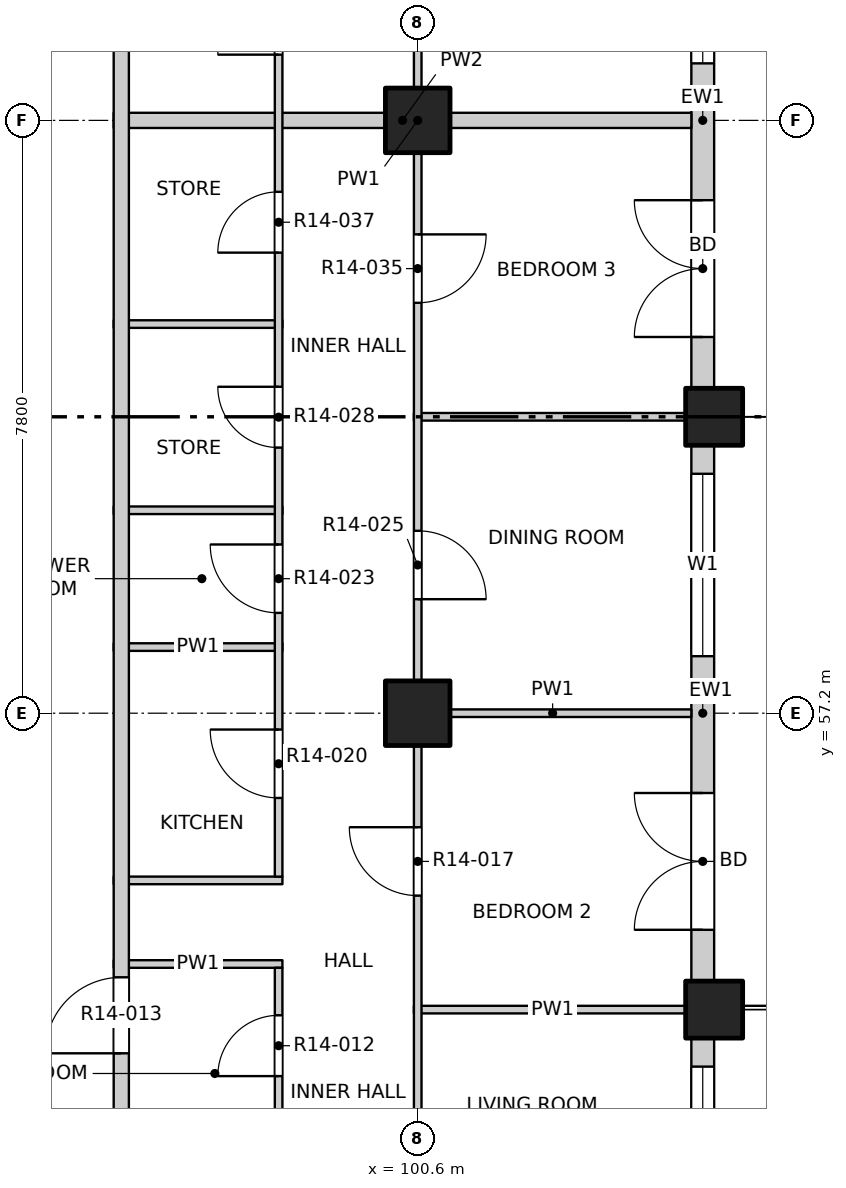
"""IFC4 building model, lengths in metres.
Left out: names, types, materials, properties, quantities, classifications, styles, units other than length and angle.
Written with IfcOpenShell. Run it as: python <this file> out.ifc"""

import sys

from ifc_helpers import new_model, si_unit, direction, frame, frame_2d, origin, origin_2d, place, context, subcontext, project, spatial, rectangle, extrude, element, fill, save


model = new_model("IFC4")
c1 = context("Model", 3, precision=1e-05, world=origin(), true_north=direction((0.0, 1.0)))
c2 = subcontext(c1, "Body", "Model", "MODEL_VIEW")
j1 = project(units=[si_unit("LENGTHUNIT", "METRE"), si_unit("PLANEANGLEUNIT", "RADIAN")], contexts=[c1])
p1 = place(None, origin())
s1 = spatial("IfcSite", under=j1, at=p1, CompositionType="ELEMENT")
p2 = place(p1, origin())
s2 = spatial("IfcBuilding", under=s1, at=p2, CompositionType="ELEMENT")
p3 = place(p2, frame((0.0, 0.0, 155.4)))
s3 = spatial("IfcBuildingStorey", under=s2, at=p3, CompositionType="ELEMENT", Elevation=155.4)
for number, where, z_axis, x_axis in (
    (1, (104.5, 53.3, -0.25), (0.0, 0.0, 1.0), (1.0, 0.0, 0.0)),
    (2, (104.5, 61.1, -0.25), (0.0, 0.0, 1.0), (1.0, 0.0, 0.0)),
):
    element("IfcColumn", number, at=place(p3, frame(where, z_axis=z_axis, x_axis=x_axis)), inside=s3, PredefinedType="COLUMN", context=c2, shape_type="SweptSolid", body=[
        extrude(rectangle(XDim=0.75, YDim=0.75, at=origin_2d()), origin(), (0.0, 0.0, 1.0), 3.4),
    ])
for number, where, z_axis, x_axis in (
    (3, (100.6, 57.2, -0.25), (0.0, 0.0, 1.0), (1.0, 0.0, 0.0)),
    (4, (100.6, 65.0, -0.25), (0.0, 0.0, 1.0), (1.0, 0.0, 0.0)),
):
    element("IfcColumn", number, at=place(p3, frame(where, z_axis=z_axis, x_axis=x_axis)), inside=s3, PredefinedType="COLUMN", context=c2, shape_type="SweptSolid", body=[
        extrude(rectangle(XDim=0.85, YDim=0.85, at=origin_2d()), origin(), (0.0, 0.0, 1.0), 3.4),
    ])
p4 = place(p3, frame((104.35, 49.4, 0.0), z_axis=(0.0, 0.0, 1.0), x_axis=(0.0, 1.0, 0.0)))
e5 = element("IfcWall", 5, at=p4, inside=s3, PredefinedType="SOLIDWALL", context=c2, shape_type="SweptSolid", body=[
    extrude(rectangle(XDim=3.525, YDim=0.3, at=frame_2d((1.763, 0.0))), origin(), (0.0, 0.0, 1.0), 2.7),
])
p5 = place(p4, frame((0.75, 0.0, 0.9)))
e6 = element("IfcOpeningElement", 6, at=p5, cuts=e5, PredefinedType="OPENING", context=c2, shape_type="SweptSolid", body=[
    extrude(rectangle(XDim=2.4, YDim=1.8, at=frame_2d((1.2, 0.9))), frame((0.0, 0.16, 0.0), z_axis=(0.0, -1.0, 0.0), x_axis=(1.0, 0.0, 0.0)), (0.0, 0.0, 1.0), 0.32),
])
p6 = place(p3, frame((104.35, 53.675, 0.0), z_axis=(0.0, 0.0, 1.0), x_axis=(0.0, 1.0, 0.0)))
e7 = element("IfcWall", 7, at=p6, inside=s3, PredefinedType="SOLIDWALL", context=c2, shape_type="SweptSolid", body=[
    extrude(rectangle(XDim=7.05, YDim=0.3, at=frame_2d((3.525, 0.0))), origin(), (0.0, 0.0, 1.0), 2.7),
])
p7 = place(p6, frame((0.675, 0.0, 0.0)))
e8 = element("IfcOpeningElement", 8, at=p7, cuts=e7, PredefinedType="OPENING", context=c2, shape_type="SweptSolid", body=[
    extrude(rectangle(XDim=1.8, YDim=2.4, at=frame_2d((0.9, 1.2))), frame((0.0, 0.16, 0.0), z_axis=(0.0, -1.0, 0.0), x_axis=(1.0, 0.0, 0.0)), (0.0, 0.0, 1.0), 0.32),
])
p8 = place(p6, frame((4.275, 0.0, 0.9)))
e9 = element("IfcOpeningElement", 9, at=p8, cuts=e7, PredefinedType="OPENING", context=c2, shape_type="SweptSolid", body=[
    extrude(rectangle(XDim=2.4, YDim=1.8, at=frame_2d((1.2, 0.9))), frame((0.0, 0.16, 0.0), z_axis=(0.0, -1.0, 0.0), x_axis=(1.0, 0.0, 0.0)), (0.0, 0.0, 1.0), 0.32),
])
p9 = place(p3, frame((104.35, 61.475, 0.0), z_axis=(0.0, 0.0, 1.0), x_axis=(0.0, 1.0, 0.0)))
e10 = element("IfcWall", 10, at=p9, inside=s3, PredefinedType="SOLIDWALL", context=c2, shape_type="SweptSolid", body=[
    extrude(rectangle(XDim=7.05, YDim=0.3, at=frame_2d((3.525, 0.0))), origin(), (0.0, 0.0, 1.0), 2.7),
])
p10 = place(p9, frame((0.675, 0.0, 0.0)))
e11 = element("IfcOpeningElement", 11, at=p10, cuts=e10, PredefinedType="OPENING", context=c2, shape_type="SweptSolid", body=[
    extrude(rectangle(XDim=1.8, YDim=2.4, at=frame_2d((0.9, 1.2))), frame((0.0, 0.16, 0.0), z_axis=(0.0, -1.0, 0.0), x_axis=(1.0, 0.0, 0.0)), (0.0, 0.0, 1.0), 0.32),
])
p11 = place(p9, frame((4.275, 0.0, 0.9)))
e12 = element("IfcOpeningElement", 12, at=p11, cuts=e10, PredefinedType="OPENING", context=c2, shape_type="SweptSolid", body=[
    extrude(rectangle(XDim=2.4, YDim=1.8, at=frame_2d((1.2, 0.9))), frame((0.0, 0.16, 0.0), z_axis=(0.0, -1.0, 0.0), x_axis=(1.0, 0.0, 0.0)), (0.0, 0.0, 1.0), 0.32),
])
p12 = place(p3, frame((100.55, 53.3, 0.0), z_axis=(0.0, 0.0, 1.0), x_axis=(1.0, 0.0, 0.0)))
e13 = element("IfcWall", 13, at=p12, inside=s3, PredefinedType="PARTITIONING", context=c2, shape_type="SweptSolid", body=[
    extrude(rectangle(XDim=3.65, YDim=0.1, at=frame_2d((1.825, 0.0))), origin(), (0.0, 0.0, 1.0), 3.15),
])
for number, where, z_axis, x_axis in (
    (14, (96.6, 53.9, 0.0), (0.0, 0.0, 1.0), (1.0, 0.0, 0.0)),
    (15, (96.6, 55.0, 0.0), (0.0, 0.0, 1.0), (1.0, 0.0, 0.0)),
):
    element("IfcWall", number, at=place(p3, frame(where, z_axis=z_axis, x_axis=x_axis)), inside=s3, PredefinedType="PARTITIONING", context=c2, shape_type="SweptSolid", body=[
        extrude(rectangle(XDim=2.22, YDim=0.1, at=frame_2d((1.11, 0.0))), origin(), (0.0, 0.0, 1.0), 3.15),
    ])
p13 = place(p3, frame((100.55, 57.2, 0.0), z_axis=(0.0, 0.0, 1.0), x_axis=(1.0, 0.0, 0.0)))
e16 = element("IfcWall", 16, at=p13, inside=s3, PredefinedType="PARTITIONING", context=c2, shape_type="SweptSolid", body=[
    extrude(rectangle(XDim=3.65, YDim=0.1, at=frame_2d((1.825, 0.0))), origin(), (0.0, 0.0, 1.0), 3.15),
])
for number, where, z_axis, x_axis in (
    (17, (96.6, 58.07, 0.0), (0.0, 0.0, 1.0), (1.0, 0.0, 0.0)),
    (18, (96.6, 59.87, 0.0), (0.0, 0.0, 1.0), (1.0, 0.0, 0.0)),
):
    element("IfcWall", number, at=place(p3, frame(where, z_axis=z_axis, x_axis=x_axis)), inside=s3, PredefinedType="PARTITIONING", context=c2, shape_type="SweptSolid", body=[
        extrude(rectangle(XDim=2.22, YDim=0.1, at=frame_2d((1.11, 0.0))), origin(), (0.0, 0.0, 1.0), 3.15),
    ])
p14 = place(p3, frame((100.55, 61.1, 0.0), z_axis=(0.0, 0.0, 1.0), x_axis=(1.0, 0.0, 0.0)))
e19 = element("IfcWall", 19, at=p14, inside=s3, PredefinedType="PARTITIONING", context=c2, shape_type="SweptSolid", body=[
    extrude(rectangle(XDim=3.65, YDim=0.1, at=frame_2d((1.825, 0.0))), origin(), (0.0, 0.0, 1.0), 2.55),
])
p15 = place(p3, frame((96.6, 62.32, 0.0), z_axis=(0.0, 0.0, 1.0), x_axis=(1.0, 0.0, 0.0)))
e20 = element("IfcWall", 20, at=p15, inside=s3, PredefinedType="PARTITIONING", context=c2, shape_type="SweptSolid", body=[
    extrude(rectangle(XDim=2.22, YDim=0.1, at=frame_2d((1.11, 0.0))), origin(), (0.0, 0.0, 1.0), 3.15),
])
p16 = place(p3, frame((96.6, 65.0, 0.0), z_axis=(0.0, 0.0, 1.0), x_axis=(1.0, 0.0, 0.0)))
e21 = element("IfcWall", 21, at=p16, inside=s3, PredefinedType="PARTITIONING", context=c2, shape_type="SweptSolid", body=[
    extrude(rectangle(XDim=7.6, YDim=0.2, at=frame_2d((3.8, 0.0))), origin(), (0.0, 0.0, 1.0), 3.15),
])
p17 = place(p3, frame((96.7, 49.5, 0.0), z_axis=(0.0, 0.0, 1.0), x_axis=(0.0, 1.0, 0.0)))
e22 = element("IfcWall", 22, at=p17, inside=s3, PredefinedType="PARTITIONING", context=c2, shape_type="SweptSolid", body=[
    extrude(rectangle(XDim=34.7, YDim=0.2, at=frame_2d((17.35, 0.0))), origin(), (0.0, 0.0, 1.0), 3.15),
])
p18 = place(p17, frame((3.225, 0.0, 0.0)))
e23 = element("IfcOpeningElement", 23, at=p18, cuts=e22, PredefinedType="OPENING", context=c2, shape_type="SweptSolid", body=[
    extrude(rectangle(XDim=1.0, YDim=2.1, at=frame_2d((0.5, 1.05))), frame((0.0, 0.11, 0.0), z_axis=(0.0, -1.0, 0.0), x_axis=(1.0, 0.0, 0.0)), (0.0, 0.0, 1.0), 0.22),
])
p19 = place(p17, frame((19.775, 0.0, 0.0)))
e24 = element("IfcOpeningElement", 24, at=p19, cuts=e22, PredefinedType="OPENING", context=c2, shape_type="SweptSolid", body=[
    extrude(rectangle(XDim=1.0, YDim=2.1, at=frame_2d((0.5, 1.05))), frame((0.0, 0.11, 0.0), z_axis=(0.0, -1.0, 0.0), x_axis=(1.0, 0.0, 0.0)), (0.0, 0.0, 1.0), 0.22),
])
p20 = place(p17, frame((24.125, 0.0, 0.0)))
e25 = element("IfcOpeningElement", 25, at=p20, cuts=e22, PredefinedType="OPENING", context=c2, shape_type="SweptSolid", body=[
    extrude(rectangle(XDim=1.0, YDim=2.1, at=frame_2d((0.5, 1.05))), frame((0.0, 0.11, 0.0), z_axis=(0.0, -1.0, 0.0), x_axis=(1.0, 0.0, 0.0)), (0.0, 0.0, 1.0), 0.22),
])
p21 = place(p3, frame((98.77, 49.45, 0.0), z_axis=(0.0, 0.0, 1.0), x_axis=(0.0, 1.0, 0.0)))
e26 = element("IfcWall", 26, at=p21, inside=s3, PredefinedType="PARTITIONING", context=c2, shape_type="SweptSolid", body=[
    extrude(rectangle(XDim=4.4, YDim=0.1, at=frame_2d((2.2, 0.0))), origin(), (0.0, 0.0, 1.0), 3.15),
])
p22 = place(p21, frame((0.675, 0.0, 0.0)))
e27 = element("IfcOpeningElement", 27, at=p22, cuts=e26, PredefinedType="OPENING", context=c2, shape_type="SweptSolid", body=[
    extrude(rectangle(XDim=0.9, YDim=2.1, at=frame_2d((0.45, 1.05))), frame((0.0, 0.06, 0.0), z_axis=(0.0, -1.0, 0.0), x_axis=(1.0, 0.0, 0.0)), (0.0, 0.0, 1.0), 0.12),
])
p23 = place(p21, frame((2.975, 0.0, 0.0)))
e28 = element("IfcOpeningElement", 28, at=p23, cuts=e26, PredefinedType="OPENING", context=c2, shape_type="SweptSolid", body=[
    extrude(rectangle(XDim=0.8, YDim=2.1, at=frame_2d((0.4, 1.05))), frame((0.0, 0.06, 0.0), z_axis=(0.0, -1.0, 0.0), x_axis=(1.0, 0.0, 0.0)), (0.0, 0.0, 1.0), 0.12),
])
p24 = place(p3, frame((98.77, 55.05, 0.0), z_axis=(0.0, 0.0, 1.0), x_axis=(0.0, 1.0, 0.0)))
e29 = element("IfcWall", 29, at=p24, inside=s3, PredefinedType="PARTITIONING", context=c2, shape_type="SweptSolid", body=[
    extrude(rectangle(XDim=15.35, YDim=0.1, at=frame_2d((7.675, 0.0))), origin(), (0.0, 0.0, 1.0), 3.15),
])
p25 = place(p24, frame((1.035, 0.0, 0.0)))
e30 = element("IfcOpeningElement", 30, at=p25, cuts=e29, PredefinedType="OPENING", context=c2, shape_type="SweptSolid", body=[
    extrude(rectangle(XDim=0.9, YDim=2.1, at=frame_2d((0.45, 1.05))), frame((0.0, 0.06, 0.0), z_axis=(0.0, -1.0, 0.0), x_axis=(1.0, 0.0, 0.0)), (0.0, 0.0, 1.0), 0.12),
])
p26 = place(p24, frame((3.47, 0.0, 0.0)))
e31 = element("IfcOpeningElement", 31, at=p26, cuts=e29, PredefinedType="OPENING", context=c2, shape_type="SweptSolid", body=[
    extrude(rectangle(XDim=0.9, YDim=2.1, at=frame_2d((0.45, 1.05))), frame((0.0, 0.06, 0.0), z_axis=(0.0, -1.0, 0.0), x_axis=(1.0, 0.0, 0.0)), (0.0, 0.0, 1.0), 0.12),
])
p27 = place(p24, frame((5.645, 0.0, 0.0)))
e32 = element("IfcOpeningElement", 32, at=p27, cuts=e29, PredefinedType="OPENING", context=c2, shape_type="SweptSolid", body=[
    extrude(rectangle(XDim=0.8, YDim=2.1, at=frame_2d((0.4, 1.05))), frame((0.0, 0.06, 0.0), z_axis=(0.0, -1.0, 0.0), x_axis=(1.0, 0.0, 0.0)), (0.0, 0.0, 1.0), 0.12),
])
p28 = place(p24, frame((8.21, 0.0, 0.0)))
e33 = element("IfcOpeningElement", 33, at=p28, cuts=e29, PredefinedType="OPENING", context=c2, shape_type="SweptSolid", body=[
    extrude(rectangle(XDim=0.8, YDim=2.1, at=frame_2d((0.4, 1.05))), frame((0.0, 0.06, 0.0), z_axis=(0.0, -1.0, 0.0), x_axis=(1.0, 0.0, 0.0)), (0.0, 0.0, 1.0), 0.12),
])
p29 = place(p24, frame((10.815, 0.0, 0.0)))
e34 = element("IfcOpeningElement", 34, at=p29, cuts=e29, PredefinedType="OPENING", context=c2, shape_type="SweptSolid", body=[
    extrude(rectangle(XDim=0.8, YDim=2.1, at=frame_2d((0.4, 1.05))), frame((0.0, 0.06, 0.0), z_axis=(0.0, -1.0, 0.0), x_axis=(1.0, 0.0, 0.0)), (0.0, 0.0, 1.0), 0.12),
])
p30 = place(p24, frame((13.49, 0.0, 0.0)))
e35 = element("IfcOpeningElement", 35, at=p30, cuts=e29, PredefinedType="OPENING", context=c2, shape_type="SweptSolid", body=[
    extrude(rectangle(XDim=0.9, YDim=2.1, at=frame_2d((0.45, 1.05))), frame((0.0, 0.06, 0.0), z_axis=(0.0, -1.0, 0.0), x_axis=(1.0, 0.0, 0.0)), (0.0, 0.0, 1.0), 0.12),
])
p31 = place(p3, frame((100.6, 45.8, 0.0), z_axis=(0.0, 0.0, 1.0), x_axis=(0.0, 1.0, 0.0)))
e36 = element("IfcWall", 36, at=p31, inside=s3, PredefinedType="PARTITIONING", context=c2, shape_type="SweptSolid", body=[
    extrude(rectangle(XDim=38.4, YDim=0.1, at=frame_2d((19.2, 0.0))), origin(), (0.0, 0.0, 1.0), 3.15),
])
p32 = place(p31, frame((1.05, 0.0, 0.0)))
e37 = element("IfcOpeningElement", 37, at=p32, cuts=e36, PredefinedType="OPENING", context=c2, shape_type="SweptSolid", body=[
    extrude(rectangle(XDim=1.2, YDim=2.1, at=frame_2d((0.6, 1.05))), frame((0.0, 0.06, 0.0), z_axis=(0.0, -1.0, 0.0), x_axis=(1.0, 0.0, 0.0)), (0.0, 0.0, 1.0), 0.12),
])
p33 = place(p31, frame((5.1, 0.0, 0.0)))
e38 = element("IfcOpeningElement", 38, at=p33, cuts=e36, PredefinedType="OPENING", context=c2, shape_type="SweptSolid", body=[
    extrude(rectangle(XDim=0.9, YDim=2.1, at=frame_2d((0.45, 1.05))), frame((0.0, 0.06, 0.0), z_axis=(0.0, -1.0, 0.0), x_axis=(1.0, 0.0, 0.0)), (0.0, 0.0, 1.0), 0.12),
])
p34 = place(p31, frame((9.0, 0.0, 0.0)))
e39 = element("IfcOpeningElement", 39, at=p34, cuts=e36, PredefinedType="OPENING", context=c2, shape_type="SweptSolid", body=[
    extrude(rectangle(XDim=0.9, YDim=2.1, at=frame_2d((0.45, 1.05))), frame((0.0, 0.06, 0.0), z_axis=(0.0, -1.0, 0.0), x_axis=(1.0, 0.0, 0.0)), (0.0, 0.0, 1.0), 0.12),
])
p35 = place(p31, frame((12.9, 0.0, 0.0)))
e40 = element("IfcOpeningElement", 40, at=p35, cuts=e36, PredefinedType="OPENING", context=c2, shape_type="SweptSolid", body=[
    extrude(rectangle(XDim=0.9, YDim=2.1, at=frame_2d((0.45, 1.05))), frame((0.0, 0.06, 0.0), z_axis=(0.0, -1.0, 0.0), x_axis=(1.0, 0.0, 0.0)), (0.0, 0.0, 1.0), 0.12),
])
p36 = place(p31, frame((16.8, 0.0, 0.0)))
e41 = element("IfcOpeningElement", 41, at=p36, cuts=e36, PredefinedType="OPENING", context=c2, shape_type="SweptSolid", body=[
    extrude(rectangle(XDim=0.9, YDim=2.1, at=frame_2d((0.45, 1.05))), frame((0.0, 0.06, 0.0), z_axis=(0.0, -1.0, 0.0), x_axis=(1.0, 0.0, 0.0)), (0.0, 0.0, 1.0), 0.12),
])
p37 = place(p31, frame((20.7, 0.0, 0.0)))
e42 = element("IfcOpeningElement", 42, at=p37, cuts=e36, PredefinedType="OPENING", context=c2, shape_type="SweptSolid", body=[
    extrude(rectangle(XDim=0.9, YDim=2.1, at=frame_2d((0.45, 1.05))), frame((0.0, 0.06, 0.0), z_axis=(0.0, -1.0, 0.0), x_axis=(1.0, 0.0, 0.0)), (0.0, 0.0, 1.0), 0.12),
])
p38 = place(p31, frame((24.6, 0.0, 0.0)))
e43 = element("IfcOpeningElement", 43, at=p38, cuts=e36, PredefinedType="OPENING", context=c2, shape_type="SweptSolid", body=[
    extrude(rectangle(XDim=0.9, YDim=2.1, at=frame_2d((0.45, 1.05))), frame((0.0, 0.06, 0.0), z_axis=(0.0, -1.0, 0.0), x_axis=(1.0, 0.0, 0.0)), (0.0, 0.0, 1.0), 0.12),
])
p39 = place(p31, frame((28.5, 0.0, 0.0)))
e44 = element("IfcOpeningElement", 44, at=p39, cuts=e36, PredefinedType="OPENING", context=c2, shape_type="SweptSolid", body=[
    extrude(rectangle(XDim=0.9, YDim=2.1, at=frame_2d((0.45, 1.05))), frame((0.0, 0.06, 0.0), z_axis=(0.0, -1.0, 0.0), x_axis=(1.0, 0.0, 0.0)), (0.0, 0.0, 1.0), 0.12),
])
p40 = place(p31, frame((32.4, 0.0, 0.0)))
e45 = element("IfcOpeningElement", 45, at=p40, cuts=e36, PredefinedType="OPENING", context=c2, shape_type="SweptSolid", body=[
    extrude(rectangle(XDim=0.9, YDim=2.1, at=frame_2d((0.45, 1.05))), frame((0.0, 0.06, 0.0), z_axis=(0.0, -1.0, 0.0), x_axis=(1.0, 0.0, 0.0)), (0.0, 0.0, 1.0), 0.12),
])
p41 = place(p31, frame((36.15, 0.0, 0.0)))
e46 = element("IfcOpeningElement", 46, at=p41, cuts=e36, PredefinedType="OPENING", context=c2, shape_type="SweptSolid", body=[
    extrude(rectangle(XDim=1.2, YDim=2.1, at=frame_2d((0.6, 1.05))), frame((0.0, 0.06, 0.0), z_axis=(0.0, -1.0, 0.0), x_axis=(1.0, 0.0, 0.0)), (0.0, 0.0, 1.0), 0.12),
])
p42 = place(p5, origin())
e47 = element("IfcWindow", 47, at=p42, inside=s3, PartitioningType="DOUBLE_PANEL_VERTICAL", PredefinedType="WINDOW", context=c2, shape_type="SweptSolid", body=[
    extrude(rectangle(XDim=2.4, YDim=1.8, at=frame_2d((1.2, 0.9))), frame((0.0, 0.03, 0.0), z_axis=(0.0, -1.0, 0.0), x_axis=(1.0, 0.0, 0.0)), (0.0, 0.0, 1.0), 0.06),
])
fill(e6, e47)
p43 = place(p7, origin())
e48 = element("IfcDoor", 48, at=p43, inside=s3, OperationType="DOUBLE_DOOR_SINGLE_SWING", PredefinedType="DOOR", context=c2, shape_type="SweptSolid", body=[
    extrude(rectangle(XDim=1.8, YDim=2.4, at=frame_2d((0.9, 1.2))), frame((0.0, 0.025, 0.0), z_axis=(0.0, -1.0, 0.0), x_axis=(1.0, 0.0, 0.0)), (0.0, 0.0, 1.0), 0.05),
])
fill(e8, e48)
p44 = place(p8, origin())
e49 = element("IfcWindow", 49, at=p44, inside=s3, PartitioningType="DOUBLE_PANEL_VERTICAL", PredefinedType="WINDOW", context=c2, shape_type="SweptSolid", body=[
    extrude(rectangle(XDim=2.4, YDim=1.8, at=frame_2d((1.2, 0.9))), frame((0.0, 0.03, 0.0), z_axis=(0.0, -1.0, 0.0), x_axis=(1.0, 0.0, 0.0)), (0.0, 0.0, 1.0), 0.06),
])
fill(e9, e49)
p45 = place(p10, origin())
e50 = element("IfcDoor", 50, at=p45, inside=s3, OperationType="DOUBLE_DOOR_SINGLE_SWING", PredefinedType="DOOR", context=c2, shape_type="SweptSolid", body=[
    extrude(rectangle(XDim=1.8, YDim=2.4, at=frame_2d((0.9, 1.2))), frame((0.0, 0.025, 0.0), z_axis=(0.0, -1.0, 0.0), x_axis=(1.0, 0.0, 0.0)), (0.0, 0.0, 1.0), 0.05),
])
fill(e11, e50)
p46 = place(p11, origin())
e51 = element("IfcWindow", 51, at=p46, inside=s3, PartitioningType="DOUBLE_PANEL_VERTICAL", PredefinedType="WINDOW", context=c2, shape_type="SweptSolid", body=[
    extrude(rectangle(XDim=2.4, YDim=1.8, at=frame_2d((1.2, 0.9))), frame((0.0, 0.03, 0.0), z_axis=(0.0, -1.0, 0.0), x_axis=(1.0, 0.0, 0.0)), (0.0, 0.0, 1.0), 0.06),
])
fill(e12, e51)
p47 = place(p23, origin())
e52 = element("IfcDoor", 52, at=p47, inside=s3, OperationType="SINGLE_SWING_LEFT", PredefinedType="DOOR", context=c2, shape_type="SweptSolid", body=[
    extrude(rectangle(XDim=0.8, YDim=2.1, at=frame_2d((0.4, 1.05))), frame((0.0, 0.025, 0.0), z_axis=(0.0, -1.0, 0.0), x_axis=(1.0, 0.0, 0.0)), (0.0, 0.0, 1.0), 0.05),
])
fill(e28, e52)
p48 = place(p18, origin())
e53 = element("IfcDoor", 53, at=p48, inside=s3, OperationType="SINGLE_SWING_RIGHT", PredefinedType="DOOR", context=c2, shape_type="SweptSolid", body=[
    extrude(rectangle(XDim=1.0, YDim=2.1, at=frame_2d((0.5, 1.05))), frame((0.0, 0.025, 0.0), z_axis=(0.0, -1.0, 0.0), x_axis=(1.0, 0.0, 0.0)), (0.0, 0.0, 1.0), 0.05),
])
fill(e23, e53)
p49 = place(p34, origin())
e54 = element("IfcDoor", 54, at=p49, inside=s3, OperationType="SINGLE_SWING_RIGHT", PredefinedType="DOOR", context=c2, shape_type="SweptSolid", body=[
    extrude(rectangle(XDim=0.9, YDim=2.1, at=frame_2d((0.45, 1.05))), frame((0.0, 0.025, 0.0), z_axis=(0.0, -1.0, 0.0), x_axis=(1.0, 0.0, 0.0)), (0.0, 0.0, 1.0), 0.05),
])
fill(e39, e54)
p50 = place(p25, origin())
e55 = element("IfcDoor", 55, at=p50, inside=s3, OperationType="SINGLE_SWING_RIGHT", PredefinedType="DOOR", context=c2, shape_type="SweptSolid", body=[
    extrude(rectangle(XDim=0.9, YDim=2.1, at=frame_2d((0.45, 1.05))), frame((0.0, 0.025, 0.0), z_axis=(0.0, -1.0, 0.0), x_axis=(1.0, 0.0, 0.0)), (0.0, 0.0, 1.0), 0.05),
])
fill(e30, e55)
p51 = place(p26, origin())
e56 = element("IfcDoor", 56, at=p51, inside=s3, OperationType="SINGLE_SWING_RIGHT", PredefinedType="DOOR", context=c2, shape_type="SweptSolid", body=[
    extrude(rectangle(XDim=0.9, YDim=2.1, at=frame_2d((0.45, 1.05))), frame((0.0, 0.025, 0.0), z_axis=(0.0, -1.0, 0.0), x_axis=(1.0, 0.0, 0.0)), (0.0, 0.0, 1.0), 0.05),
])
fill(e31, e56)
p52 = place(p35, origin())
e57 = element("IfcDoor", 57, at=p52, inside=s3, OperationType="SINGLE_SWING_RIGHT", PredefinedType="DOOR", context=c2, shape_type="SweptSolid", body=[
    extrude(rectangle(XDim=0.9, YDim=2.1, at=frame_2d((0.45, 1.05))), frame((0.0, 0.025, 0.0), z_axis=(0.0, -1.0, 0.0), x_axis=(1.0, 0.0, 0.0)), (0.0, 0.0, 1.0), 0.05),
])
fill(e40, e57)
p53 = place(p27, origin())
e58 = element("IfcDoor", 58, at=p53, inside=s3, OperationType="SINGLE_SWING_RIGHT", PredefinedType="DOOR", context=c2, shape_type="SweptSolid", body=[
    extrude(rectangle(XDim=0.8, YDim=2.1, at=frame_2d((0.4, 1.05))), frame((0.0, 0.025, 0.0), z_axis=(0.0, -1.0, 0.0), x_axis=(1.0, 0.0, 0.0)), (0.0, 0.0, 1.0), 0.05),
])
fill(e32, e58)
p54 = place(p36, origin())
e59 = element("IfcDoor", 59, at=p54, inside=s3, OperationType="SINGLE_SWING_LEFT", PredefinedType="DOOR", context=c2, shape_type="SweptSolid", body=[
    extrude(rectangle(XDim=0.9, YDim=2.1, at=frame_2d((0.45, 1.05))), frame((0.0, 0.025, 0.0), z_axis=(0.0, -1.0, 0.0), x_axis=(1.0, 0.0, 0.0)), (0.0, 0.0, 1.0), 0.05),
])
fill(e41, e59)
p55 = place(p28, origin())
e60 = element("IfcDoor", 60, at=p55, inside=s3, OperationType="SINGLE_SWING_LEFT", PredefinedType="DOOR", context=c2, shape_type="SweptSolid", body=[
    extrude(rectangle(XDim=0.8, YDim=2.1, at=frame_2d((0.4, 1.05))), frame((0.0, 0.025, 0.0), z_axis=(0.0, -1.0, 0.0), x_axis=(1.0, 0.0, 0.0)), (0.0, 0.0, 1.0), 0.05),
])
fill(e33, e60)
p56 = place(p29, origin())
e61 = element("IfcDoor", 61, at=p56, inside=s3, OperationType="SINGLE_SWING_LEFT", PredefinedType="DOOR", context=c2, shape_type="SweptSolid", body=[
    extrude(rectangle(XDim=0.8, YDim=2.1, at=frame_2d((0.4, 1.05))), frame((0.0, 0.025, 0.0), z_axis=(0.0, -1.0, 0.0), x_axis=(1.0, 0.0, 0.0)), (0.0, 0.0, 1.0), 0.05),
])
fill(e34, e61)
save(model, sys.argv[1])
